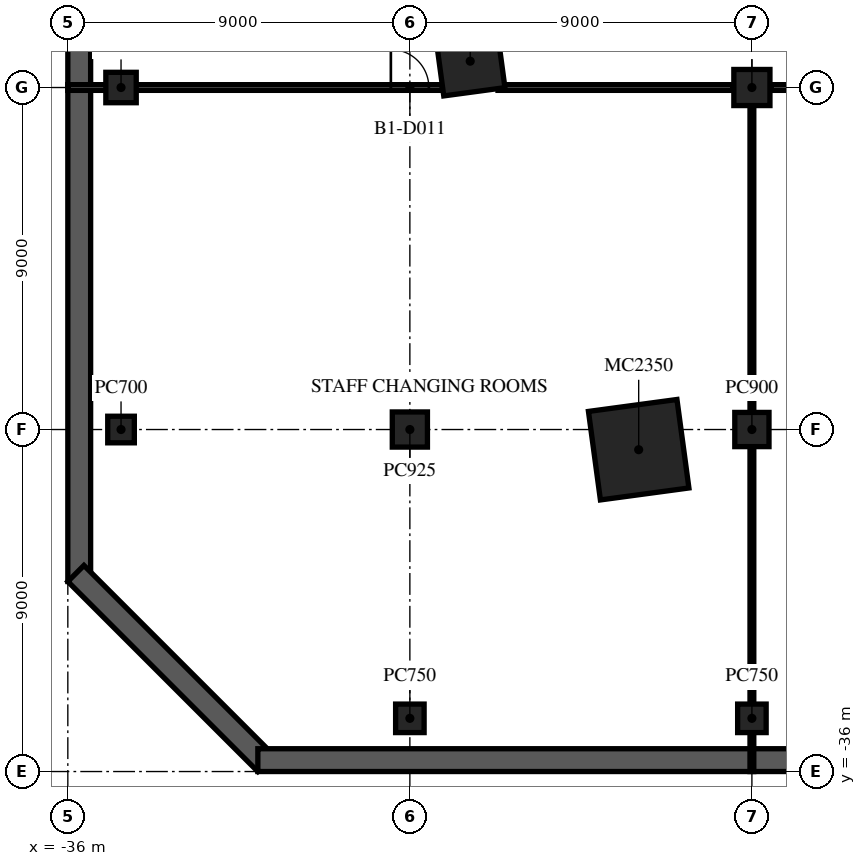
"""IFC4 building model, lengths in metres.
Left out: names, types, materials, properties, quantities, classifications, styles, units other than length and angle.
Written with IfcOpenShell. Run it as: python <this file> out.ifc"""

import sys

from ifc_helpers import new_model, si_unit, direction, frame, frame_2d, origin, origin_2d, place, context, subcontext, project, spatial, rectangle, extrude, element, fill, save


model = new_model("IFC4")
c1 = context("Model", 3, precision=1e-05, world=origin(), true_north=direction((0.0, 1.0)))
c2 = subcontext(c1, "Body", "Model", "MODEL_VIEW")
j1 = project(units=[si_unit("LENGTHUNIT", "METRE"), si_unit("PLANEANGLEUNIT", "RADIAN")], contexts=[c1])
p1 = place(None, origin())
s1 = spatial("IfcSite", under=j1, at=p1, CompositionType="ELEMENT")
p2 = place(p1, origin())
s2 = spatial("IfcBuilding", under=s1, at=p2, CompositionType="ELEMENT")
p3 = place(p2, frame((0.0, 0.0, -4.5)))
s3 = spatial("IfcBuildingStorey", under=s2, at=p3, CompositionType="ELEMENT", Elevation=-4.5)
p4 = place(p3, frame((-35.7, 31.0, -0.3), z_axis=(0.0, 0.0, 1.0), x_axis=(0.0, -1.0, 0.0)))
e1 = element("IfcWall", 1, at=p4, inside=s3, PredefinedType="SOLIDWALL", context=c2, shape_type="SweptSolid", body=[
    extrude(rectangle(XDim=62.0, YDim=0.6, at=frame_2d((31.0, 0.0))), origin(), (0.0, 0.0, 1.0), 4.4),
])
p5 = place(p3, frame((-35.788, -30.788, -0.3), z_axis=(0.0, 0.0, 1.0), x_axis=(0.707106781187, -0.707106781187, 0.0)))
e2 = element("IfcWall", 2, at=p5, inside=s3, PredefinedType="SOLIDWALL", context=c2, shape_type="SweptSolid", body=[
    extrude(rectangle(XDim=7.071, YDim=0.6, at=frame_2d((3.536, 0.0))), origin(), (0.0, 0.0, 1.0), 4.4),
])
p6 = place(p3, frame((-31.0, -35.7, -0.3), z_axis=(0.0, 0.0, 1.0), x_axis=(1.0, 0.0, 0.0)))
e3 = element("IfcWall", 3, at=p6, inside=s3, PredefinedType="SOLIDWALL", context=c2, shape_type="SweptSolid", body=[
    extrude(rectangle(XDim=62.0, YDim=0.6, at=frame_2d((31.0, 0.0))), origin(), (0.0, 0.0, 1.0), 4.4),
])
p7 = place(p3, frame((-34.6, -27.0, 0.0), z_axis=(0.0, 0.0, 1.0), x_axis=(1.0, 0.0, 0.0)))
e4 = element("IfcColumn", 4, at=p7, inside=s3, PredefinedType="COLUMN", context=c2, shape_type="SweptSolid", body=[
    extrude(rectangle(XDim=0.7, YDim=0.7, at=origin_2d()), origin(), (0.0, 0.0, 1.0), 4.5),
])
p8 = place(p3, frame((-34.6, -18.0, 0.0), z_axis=(0.0, 0.0, 1.0), x_axis=(1.0, 0.0, 0.0)))
e5 = element("IfcColumn", 5, at=p8, inside=s3, PredefinedType="COLUMN", context=c2, shape_type="SweptSolid", body=[
    extrude(rectangle(XDim=0.8, YDim=0.8, at=origin_2d()), origin(), (0.0, 0.0, 1.0), 4.5),
])
p9 = place(p3, frame((-27.0, -34.6, 0.0), z_axis=(0.0, 0.0, 1.0), x_axis=(1.0, 0.0, 0.0)))
e6 = element("IfcColumn", 6, at=p9, inside=s3, PredefinedType="COLUMN", context=c2, shape_type="SweptSolid", body=[
    extrude(rectangle(XDim=0.75, YDim=0.75, at=origin_2d()), origin(), (0.0, 0.0, 1.0), 4.5),
])
p10 = place(p3, frame((-27.0, -27.0, 0.0), z_axis=(0.0, 0.0, 1.0), x_axis=(1.0, 0.0, 0.0)))
e7 = element("IfcColumn", 7, at=p10, inside=s3, PredefinedType="COLUMN", context=c2, shape_type="SweptSolid", body=[
    extrude(rectangle(XDim=0.925, YDim=0.925, at=origin_2d()), origin(), (0.0, 0.0, 1.0), 4.5),
])
p11 = place(p3, frame((-18.0, -34.6, 0.0), z_axis=(0.0, 0.0, 1.0), x_axis=(1.0, 0.0, 0.0)))
e8 = element("IfcColumn", 8, at=p11, inside=s3, PredefinedType="COLUMN", context=c2, shape_type="SweptSolid", body=[
    extrude(rectangle(XDim=0.75, YDim=0.75, at=origin_2d()), origin(), (0.0, 0.0, 1.0), 4.5),
])
p12 = place(p3, frame((-18.0, -27.0, 0.0), z_axis=(0.0, 0.0, 1.0), x_axis=(1.0, 0.0, 0.0)))
e9 = element("IfcColumn", 9, at=p12, inside=s3, PredefinedType="COLUMN", context=c2, shape_type="SweptSolid", body=[
    extrude(rectangle(XDim=0.9, YDim=0.9, at=origin_2d()), origin(), (0.0, 0.0, 1.0), 4.5),
])
p13 = place(p3, frame((-18.0, -18.0, 0.0), z_axis=(0.0, 0.0, 1.0), x_axis=(1.0, 0.0, 0.0)))
e10 = element("IfcColumn", 10, at=p13, inside=s3, PredefinedType="COLUMN", context=c2, shape_type="SweptSolid", body=[
    extrude(rectangle(XDim=0.95, YDim=0.95, at=origin_2d()), origin(), (0.0, 0.0, 1.0), 4.5),
])
p14 = place(p3, frame((-25.412, -17.307, 0.0), z_axis=(0.0, 0.0, 1.0), x_axis=(0.991001197216, 0.133853005627, 0.0)))
e11 = element("IfcColumn", 11, at=p14, inside=s3, PredefinedType="COLUMN", context=c2, shape_type="SweptSolid", body=[
    extrude(rectangle(XDim=1.625, YDim=1.625, at=origin_2d()), origin(), (0.0, 0.0, 1.0), 4.5),
])
p15 = place(p3, frame((-20.979, -27.531, 0.0), z_axis=(0.0, 0.0, 1.0), x_axis=(0.991001197216, 0.133853005627, 0.0)))
e12 = element("IfcColumn", 12, at=p15, inside=s3, PredefinedType="COLUMN", context=c2, shape_type="SweptSolid", body=[
    extrude(rectangle(XDim=2.35, YDim=2.35, at=origin_2d()), origin(), (0.0, 0.0, 1.0), 4.5),
])
p16 = place(p3, frame((-36.0, -18.0, 0.0), z_axis=(0.0, 0.0, 1.0), x_axis=(1.0, 0.0, 0.0)))
e13 = element("IfcWall", 13, at=p16, inside=s3, PredefinedType="PARTITIONING", context=c2, shape_type="SweptSolid", body=[
    extrude(rectangle(XDim=9.857, YDim=0.15, at=frame_2d((4.928, 0.0))), origin(), (0.0, 0.0, 1.0), 4.1),
])
p17 = place(p16, frame((8.5, 0.0, 0.0)))
e14 = element("IfcOpeningElement", 14, at=p17, cuts=e13, PredefinedType="OPENING", context=c2, shape_type="SweptSolid", body=[
    extrude(rectangle(XDim=1.0, YDim=2.1, at=frame_2d((0.5, 1.05))), frame((0.0, 0.085, 0.0), z_axis=(0.0, -1.0, 0.0), x_axis=(1.0, 0.0, 0.0)), (0.0, 0.0, 1.0), 0.17),
])
p18 = place(p3, frame((-24.681, -18.0, 0.0), z_axis=(0.0, 0.0, 1.0), x_axis=(1.0, 0.0, 0.0)))
e15 = element("IfcWall", 15, at=p18, inside=s3, PredefinedType="PARTITIONING", context=c2, shape_type="SweptSolid", body=[
    extrude(rectangle(XDim=6.181, YDim=0.15, at=frame_2d((3.09, 0.0))), origin(), (0.0, 0.0, 1.0), 4.1),
])
p19 = place(p3, frame((-17.5, -18.0, 0.0), z_axis=(0.0, 0.0, 1.0), x_axis=(1.0, 0.0, 0.0)))
e16 = element("IfcWall", 16, at=p19, inside=s3, PredefinedType="PARTITIONING", context=c2, shape_type="SweptSolid", body=[
    extrude(rectangle(XDim=8.0, YDim=0.15, at=frame_2d((4.0, 0.0))), origin(), (0.0, 0.0, 1.0), 4.1),
])
p20 = place(p19, frame((1.2, 0.0, 0.0)))
e17 = element("IfcOpeningElement", 17, at=p20, cuts=e16, PredefinedType="OPENING", context=c2, shape_type="SweptSolid", body=[
    extrude(rectangle(XDim=1.0, YDim=2.1, at=frame_2d((0.5, 1.05))), frame((0.0, 0.085, 0.0), z_axis=(0.0, -1.0, 0.0), x_axis=(1.0, 0.0, 0.0)), (0.0, 0.0, 1.0), 0.17),
])
p21 = place(p3, frame((-18.0, -36.0, 0.0), z_axis=(0.0, 0.0, 1.0), x_axis=(0.0, 1.0, 0.0)))
e18 = element("IfcWall", 18, at=p21, inside=s3, PredefinedType="PARTITIONING", context=c2, shape_type="SweptSolid", body=[
    extrude(rectangle(XDim=8.5, YDim=0.1, at=frame_2d((4.25, 0.0))), origin(), (0.0, 0.0, 1.0), 4.1),
])
p22 = place(p3, frame((-18.0, -26.5, 0.0), z_axis=(0.0, 0.0, 1.0), x_axis=(0.0, 1.0, 0.0)))
e19 = element("IfcWall", 19, at=p22, inside=s3, PredefinedType="PARTITIONING", context=c2, shape_type="SweptSolid", body=[
    extrude(rectangle(XDim=8.0, YDim=0.1, at=frame_2d((4.0, 0.0))), origin(), (0.0, 0.0, 1.0), 4.1),
])
p23 = place(p17, origin())
e20 = element("IfcDoor", 20, at=p23, inside=s3, OperationType="SINGLE_SWING_LEFT", PredefinedType="DOOR", context=c2, shape_type="SweptSolid", body=[
    extrude(rectangle(XDim=1.0, YDim=2.1, at=frame_2d((0.5, 1.05))), frame((0.0, 0.025, 0.0), z_axis=(0.0, -1.0, 0.0), x_axis=(1.0, 0.0, 0.0)), (0.0, 0.0, 1.0), 0.05),
])
fill(e14, e20)
save(model, sys.argv[1])
